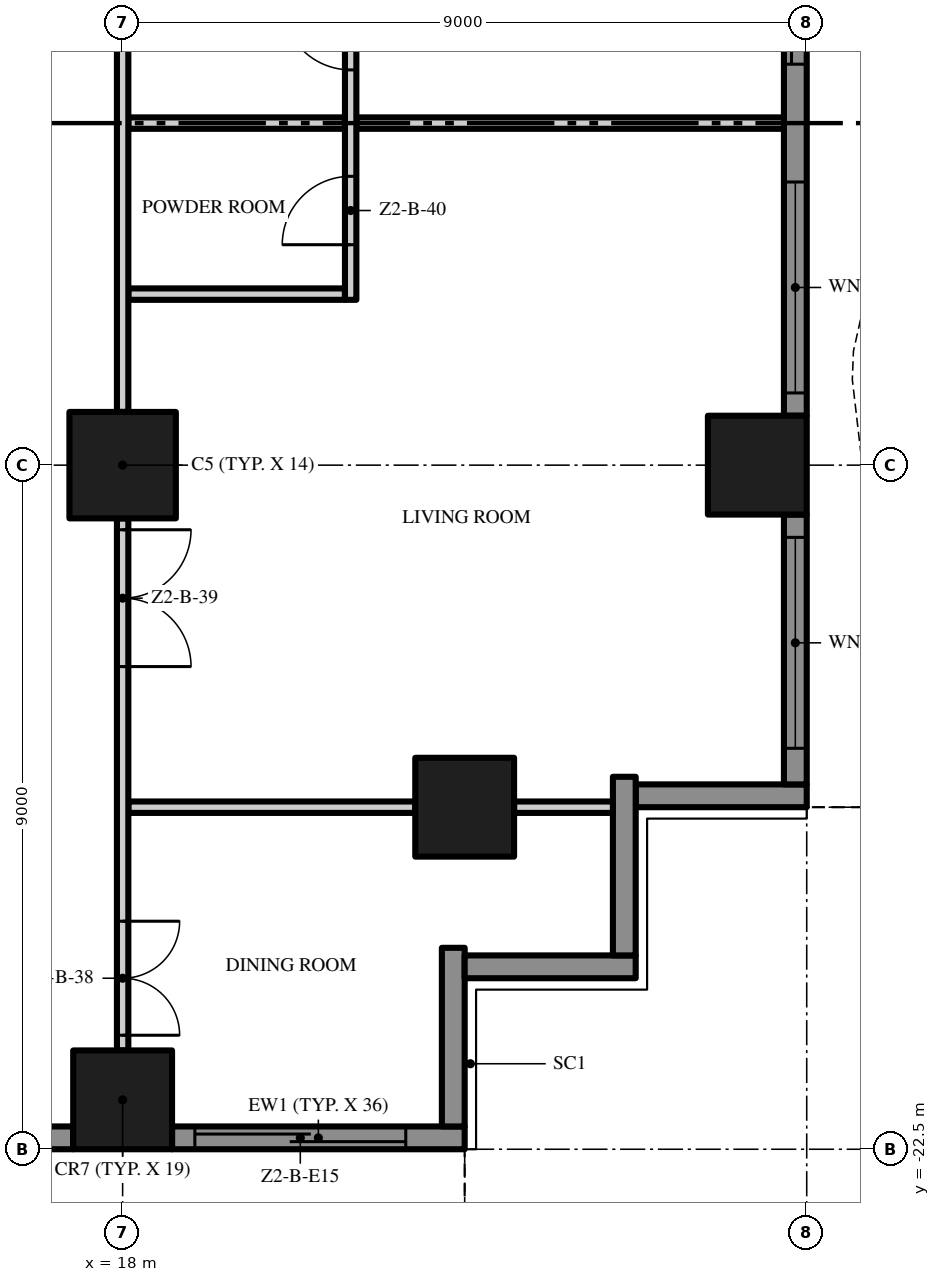
"""IFC4 building model, lengths in metres.
Left out: names, types, materials, properties, quantities, classifications, styles, units other than length and angle.
Written with IfcOpenShell. Run it as: python <this file> out.ifc"""

import sys

from ifc_helpers import new_model, si_unit, direction, frame, frame_2d, origin, origin_2d, place, context, subcontext, project, spatial, polyline, rectangle, outline, extrude, element, fill, save


model = new_model("IFC4")
c1 = context("Model", 3, precision=1e-05, world=origin(), true_north=direction((0.0, 1.0)))
c2 = subcontext(c1, "Body", "Model", "MODEL_VIEW")
j1 = project(units=[si_unit("LENGTHUNIT", "METRE"), si_unit("PLANEANGLEUNIT", "RADIAN")], contexts=[c1])
p1 = place(None, origin())
s1 = spatial("IfcSite", under=j1, at=p1, CompositionType="ELEMENT")
p2 = place(p1, origin())
s2 = spatial("IfcBuilding", under=s1, at=p2, CompositionType="ELEMENT")
p3 = place(p2, frame((0.0, 0.0, 88.4)))
s3 = spatial("IfcBuildingStorey", under=s2, at=p3, CompositionType="ELEMENT", Elevation=88.4)
p4 = place(p3, frame((18.0, -13.5, 0.0), z_axis=(0.0, 0.0, 1.0), x_axis=(1.0, 0.0, 0.0)))
e1 = element("IfcColumn", 1, at=p4, inside=s3, PredefinedType="COLUMN", context=c2, shape_type="SweptSolid", body=[
    extrude(rectangle(XDim=1.4, YDim=1.4, at=origin_2d()), origin(), (0.0, 0.0, 1.0), 3.5),
])
for number, where, z_axis, x_axis in (
    (2, (18.0, -21.85, 0.0), (0.0, 0.0, 1.0), (1.0, 0.0, 0.0)),
    (3, (26.35, -13.5, 0.0), (0.0, 0.0, 1.0), (1.0, 0.0, 0.0)),
    (4, (22.5, -18.0, 0.0), (0.0, 0.0, 1.0), (1.0, 0.0, 0.0)),
):
    element("IfcColumn", number, at=place(p3, frame(where, z_axis=z_axis, x_axis=x_axis)), inside=s3, PredefinedType="COLUMN", context=c2, shape_type="SweptSolid", body=[
        extrude(rectangle(XDim=1.3, YDim=1.3, at=origin_2d()), origin(), (0.0, 0.0, 1.0), 3.5),
    ])
p5 = place(p3, frame((17.35, -22.35, 0.0), z_axis=(0.0, 0.0, 1.0), x_axis=(-1.0, 0.0, 0.0)))
e5 = element("IfcWall", 5, at=p5, inside=s3, PredefinedType="SOLIDWALL", context=c2, shape_type="SweptSolid", body=[
    extrude(rectangle(XDim=7.7, YDim=0.3, at=frame_2d((3.85, 0.0))), origin(), (0.0, 0.0, 1.0), 3.5),
])
p6 = place(p5, frame((4.625, 0.0, 0.45)))
e6 = element("IfcOpeningElement", 6, at=p6, cuts=e5, PredefinedType="OPENING", context=c2, shape_type="SweptSolid", body=[
    extrude(rectangle(XDim=2.775, YDim=2.65, at=frame_2d((1.387, 1.325))), frame((0.0, 0.16, 0.0), z_axis=(0.0, -1.0, 0.0), x_axis=(1.0, 0.0, 0.0)), (0.0, 0.0, 1.0), 0.32),
])
p7 = place(p5, frame((0.3, 0.0, 0.45)))
e7 = element("IfcOpeningElement", 7, at=p7, cuts=e5, PredefinedType="OPENING", context=c2, shape_type="SweptSolid", body=[
    extrude(rectangle(XDim=2.775, YDim=2.65, at=frame_2d((1.387, 1.325))), frame((0.0, 0.16, 0.0), z_axis=(0.0, -1.0, 0.0), x_axis=(1.0, 0.0, 0.0)), (0.0, 0.0, 1.0), 0.32),
])
p8 = place(p3, frame((22.5, -22.35, 0.0), z_axis=(0.0, 0.0, 1.0), x_axis=(-1.0, 0.0, 0.0)))
e8 = element("IfcWall", 8, at=p8, inside=s3, PredefinedType="SOLIDWALL", context=c2, shape_type="SweptSolid", body=[
    extrude(rectangle(XDim=3.85, YDim=0.3, at=frame_2d((1.925, 0.0))), origin(), (0.0, 0.0, 1.0), 3.5),
])
p9 = place(p8, frame((0.775, 0.0, 0.0)))
e9 = element("IfcOpeningElement", 9, at=p9, cuts=e8, PredefinedType="OPENING", context=c2, shape_type="SweptSolid", body=[
    extrude(rectangle(XDim=2.775, YDim=2.4, at=frame_2d((1.387, 1.2))), frame((0.0, 0.16, 0.0), z_axis=(0.0, -1.0, 0.0), x_axis=(1.0, 0.0, 0.0)), (0.0, 0.0, 1.0), 0.32),
])
p10 = place(p3, frame((22.35, -19.85, 0.0), z_axis=(0.0, 0.0, 1.0), x_axis=(0.0, -1.0, 0.0)))
e10 = element("IfcWall", 10, at=p10, inside=s3, PredefinedType="SOLIDWALL", context=c2, shape_type="SweptSolid", body=[
    extrude(rectangle(XDim=2.35, YDim=0.3, at=frame_2d((1.175, 0.0))), origin(), (0.0, 0.0, 1.0), 3.5),
])
p11 = place(p3, frame((24.75, -20.1, 0.0), z_axis=(0.0, 0.0, 1.0), x_axis=(-1.0, 0.0, 0.0)))
e11 = element("IfcWall", 11, at=p11, inside=s3, PredefinedType="SOLIDWALL", context=c2, shape_type="SweptSolid", body=[
    extrude(rectangle(XDim=2.25, YDim=0.3, at=frame_2d((1.125, 0.0))), origin(), (0.0, 0.0, 1.0), 3.5),
])
p12 = place(p3, frame((24.6, -17.6, 0.0), z_axis=(0.0, 0.0, 1.0), x_axis=(0.0, -1.0, 0.0)))
e12 = element("IfcWall", 12, at=p12, inside=s3, PredefinedType="SOLIDWALL", context=c2, shape_type="SweptSolid", body=[
    extrude(rectangle(XDim=2.35, YDim=0.3, at=frame_2d((1.175, 0.0))), origin(), (0.0, 0.0, 1.0), 3.5),
])
p13 = place(p3, frame((27.0, -17.85, 0.0), z_axis=(0.0, 0.0, 1.0), x_axis=(-1.0, 0.0, 0.0)))
e13 = element("IfcWall", 13, at=p13, inside=s3, PredefinedType="SOLIDWALL", context=c2, shape_type="SweptSolid", body=[
    extrude(rectangle(XDim=2.25, YDim=0.3, at=frame_2d((1.125, 0.0))), origin(), (0.0, 0.0, 1.0), 3.5),
])
p14 = place(p3, frame((26.85, -14.15, 0.0), z_axis=(0.0, 0.0, 1.0), x_axis=(0.0, -1.0, 0.0)))
e14 = element("IfcWall", 14, at=p14, inside=s3, PredefinedType="SOLIDWALL", context=c2, shape_type="SweptSolid", body=[
    extrude(rectangle(XDim=3.55, YDim=0.3, at=frame_2d((1.775, 0.0))), origin(), (0.0, 0.0, 1.0), 3.5),
])
p15 = place(p14, frame((0.3, 0.0, 0.45)))
e15 = element("IfcOpeningElement", 15, at=p15, cuts=e14, PredefinedType="OPENING", context=c2, shape_type="SweptSolid", body=[
    extrude(rectangle(XDim=2.775, YDim=2.65, at=frame_2d((1.387, 1.325))), frame((0.0, 0.16, 0.0), z_axis=(0.0, -1.0, 0.0), x_axis=(1.0, 0.0, 0.0)), (0.0, 0.0, 1.0), 0.32),
])
p16 = place(p3, frame((26.85, -5.15, 0.0), z_axis=(0.0, 0.0, 1.0), x_axis=(0.0, -1.0, 0.0)))
e16 = element("IfcWall", 16, at=p16, inside=s3, PredefinedType="SOLIDWALL", context=c2, shape_type="SweptSolid", body=[
    extrude(rectangle(XDim=7.7, YDim=0.3, at=frame_2d((3.85, 0.0))), origin(), (0.0, 0.0, 1.0), 3.5),
])
p17 = place(p16, frame((4.625, 0.0, 0.45)))
e17 = element("IfcOpeningElement", 17, at=p17, cuts=e16, PredefinedType="OPENING", context=c2, shape_type="SweptSolid", body=[
    extrude(rectangle(XDim=2.775, YDim=2.65, at=frame_2d((1.387, 1.325))), frame((0.0, 0.16, 0.0), z_axis=(0.0, -1.0, 0.0), x_axis=(1.0, 0.0, 0.0)), (0.0, 0.0, 1.0), 0.32),
])
p18 = place(p16, frame((0.3, 0.0, 0.0)))
e18 = element("IfcOpeningElement", 18, at=p18, cuts=e16, PredefinedType="OPENING", context=c2, shape_type="SweptSolid", body=[
    extrude(rectangle(XDim=2.775, YDim=2.4, at=frame_2d((1.387, 1.2))), frame((0.0, 0.16, 0.0), z_axis=(0.0, -1.0, 0.0), x_axis=(1.0, 0.0, 0.0)), (0.0, 0.0, 1.0), 0.32),
])
p19 = place(p3, origin())
e19 = element("IfcWall", 19, at=p19, inside=s3, PredefinedType="USERDEFINED", context=c2, shape_type="SweptSolid", body=[
    extrude(outline(polyline([(-22.5, -25.149), (-21.0, -24.488), (-19.5, -23.755), (-18.0, -23.231), (-16.875, -23.1), (-16.5, -23.115), (-15.0, -23.451), (-13.5, -24.112), (-12.0, -24.845), (-10.5, -25.369), (-9.375, -25.5), (-9.0, -25.485), (-7.5, -25.149), (-6.0, -24.488), (-4.5, -23.755), (-3.0, -23.231), (-1.875, -23.1), (-1.5, -23.115), (0.0, -23.451), (1.5, -24.112), (3.0, -24.845), (4.5, -25.369), (5.625, -25.5), (6.0, -25.485), (7.5, -25.149), (9.0, -24.488), (10.5, -23.755), (12.0, -23.231), (13.125, -23.1), (13.5, -23.115), (15.0, -23.451), (16.5, -24.112), (18.0, -24.845), (19.5, -25.369), (20.625, -25.5), (21.0, -25.485), (22.5, -25.149), (22.445, -24.905), (20.967, -25.236), (20.635, -25.249), (19.556, -25.124), (18.096, -24.614), (16.605, -23.885), (15.079, -23.213), (13.533, -22.866), (13.115, -22.849), (11.944, -22.986), (10.404, -23.524), (8.895, -24.261), (7.421, -24.91), (5.967, -25.236), (5.635, -25.249), (4.556, -25.124), (3.096, -24.614), (1.605, -23.885), (0.079, -23.213), (-1.467, -22.866), (-1.885, -22.849), (-3.056, -22.986), (-4.596, -23.524), (-6.105, -24.261), (-7.579, -24.91), (-9.033, -25.236), (-9.365, -25.249), (-10.444, -25.124), (-11.904, -24.614), (-13.395, -23.885), (-14.921, -23.213), (-16.467, -22.866), (-16.885, -22.849), (-18.056, -22.986), (-19.596, -23.524), (-21.105, -24.261), (-22.601, -24.92), (-22.5, -25.149)])), origin(), (0.0, 0.0, 1.0), 0.9),
])
p20 = place(p3, origin())
e20 = element("IfcWall", 20, at=p20, inside=s3, PredefinedType="USERDEFINED", context=c2, shape_type="SweptSolid", body=[
    extrude(outline(polyline([(29.649, -18.0), (28.988, -16.5), (28.255, -15.0), (27.731, -13.5), (27.6, -12.375), (27.615, -12.0), (27.951, -10.5), (28.612, -9.0), (29.345, -7.5), (29.869, -6.0), (30.0, -4.875), (29.985, -4.5), (29.649, -3.0), (28.988, -1.5), (28.255, 0.0), (27.731, 1.5), (27.6, 2.625), (27.615, 3.0), (27.951, 4.5), (28.612, 6.0), (29.345, 7.5), (29.869, 9.0), (30.0, 10.125), (29.985, 10.5), (29.649, 12.0), (28.988, 13.5), (28.255, 15.0), (27.731, 16.5), (27.6, 17.625), (27.615, 18.0), (27.365, 18.01), (27.349, 17.615), (27.486, 16.444), (28.024, 14.904), (28.761, 13.395), (29.41, 11.921), (29.736, 10.467), (29.749, 10.135), (29.624, 9.056), (29.114, 7.596), (28.385, 6.105), (27.713, 4.579), (27.366, 3.033), (27.349, 2.615), (27.486, 1.444), (28.024, -0.096), (28.761, -1.605), (29.41, -3.079), (29.736, -4.533), (29.749, -4.865), (29.624, -5.944), (29.114, -7.404), (28.385, -8.895), (27.713, -10.421), (27.366, -11.967), (27.349, -12.385), (27.486, -13.556), (28.024, -15.096), (28.761, -16.605), (29.42, -18.101), (29.649, -18.0)])), origin(), (0.0, 0.0, 1.0), 0.9),
])
p21 = place(p3, frame((18.075, -18.0, 0.0), z_axis=(0.0, 0.0, 1.0), x_axis=(1.0, 0.0, 0.0)))
e21 = element("IfcWall", 21, at=p21, inside=s3, PredefinedType="PARTITIONING", context=c2, shape_type="SweptSolid", body=[
    extrude(rectangle(XDim=3.775, YDim=0.15, at=frame_2d((1.887, 0.0))), origin(), (0.0, 0.0, 1.0), 3.5),
])
p22 = place(p3, frame((23.15, -18.0, 0.0), z_axis=(0.0, 0.0, 1.0), x_axis=(1.0, 0.0, 0.0)))
e22 = element("IfcWall", 22, at=p22, inside=s3, PredefinedType="PARTITIONING", context=c2, shape_type="SweptSolid", body=[
    extrude(rectangle(XDim=1.3, YDim=0.15, at=frame_2d((0.65, 0.0))), origin(), (0.0, 0.0, 1.0), 3.5),
])
for number, where, z_axis, x_axis in (
    (23, (18.075, -11.25, 0.0), (0.0, 0.0, 1.0), (1.0, 0.0, 0.0)),
    (24, (18.075, -9.0, 0.0), (0.0, 0.0, 1.0), (1.0, 0.0, 0.0)),
):
    element("IfcWall", number, at=place(p3, frame(where, z_axis=z_axis, x_axis=x_axis)), inside=s3, PredefinedType="PARTITIONING", context=c2, shape_type="SweptSolid", body=[
        extrude(rectangle(XDim=2.85, YDim=0.15, at=frame_2d((1.425, 0.0))), origin(), (0.0, 0.0, 1.0), 3.5),
    ])
p23 = place(p3, frame((21.075, -9.0, 0.0), z_axis=(0.0, 0.0, 1.0), x_axis=(1.0, 0.0, 0.0)))
e25 = element("IfcWall", 25, at=p23, inside=s3, PredefinedType="PARTITIONING", context=c2, shape_type="SweptSolid", body=[
    extrude(rectangle(XDim=5.625, YDim=0.15, at=frame_2d((2.812, 0.0))), origin(), (0.0, 0.0, 1.0), 3.5),
])
p24 = place(p3, frame((18.0, -14.2, 0.0), z_axis=(0.0, 0.0, 1.0), x_axis=(0.0, -1.0, 0.0)))
e26 = element("IfcWall", 26, at=p24, inside=s3, PredefinedType="PARTITIONING", context=c2, shape_type="SweptSolid", body=[
    extrude(rectangle(XDim=7.0, YDim=0.15, at=frame_2d((3.5, 0.0))), origin(), (0.0, 0.0, 1.0), 3.5),
])
p25 = place(p24, frame((5.3, 0.0, 0.0)))
e27 = element("IfcOpeningElement", 27, at=p25, cuts=e26, PredefinedType="OPENING", context=c2, shape_type="SweptSolid", body=[
    extrude(rectangle(XDim=1.5, YDim=2.4, at=frame_2d((0.75, 1.2))), frame((0.0, 0.085, 0.0), z_axis=(0.0, -1.0, 0.0), x_axis=(1.0, 0.0, 0.0)), (0.0, 0.0, 1.0), 0.17),
])
p26 = place(p24, frame((0.15, 0.0, 0.0)))
e28 = element("IfcOpeningElement", 28, at=p26, cuts=e26, PredefinedType="OPENING", context=c2, shape_type="SweptSolid", body=[
    extrude(rectangle(XDim=1.8, YDim=2.4, at=frame_2d((0.9, 1.2))), frame((0.0, 0.085, 0.0), z_axis=(0.0, -1.0, 0.0), x_axis=(1.0, 0.0, 0.0)), (0.0, 0.0, 1.0), 0.17),
])
p27 = place(p3, frame((18.0, -5.2, 0.0), z_axis=(0.0, 0.0, 1.0), x_axis=(0.0, -1.0, 0.0)))
e29 = element("IfcWall", 29, at=p27, inside=s3, PredefinedType="PARTITIONING", context=c2, shape_type="SweptSolid", body=[
    extrude(rectangle(XDim=7.6, YDim=0.15, at=frame_2d((3.8, 0.0))), origin(), (0.0, 0.0, 1.0), 3.5),
])
p28 = place(p27, frame((0.15, 0.0, 0.0)))
e30 = element("IfcOpeningElement", 30, at=p28, cuts=e29, PredefinedType="OPENING", context=c2, shape_type="SweptSolid", body=[
    extrude(rectangle(XDim=1.0, YDim=2.4, at=frame_2d((0.5, 1.2))), frame((0.0, 0.085, 0.0), z_axis=(0.0, -1.0, 0.0), x_axis=(1.0, 0.0, 0.0)), (0.0, 0.0, 1.0), 0.17),
])
p29 = place(p3, frame((21.0, -11.325, 0.0), z_axis=(0.0, 0.0, 1.0), x_axis=(0.0, 1.0, 0.0)))
e31 = element("IfcWall", 31, at=p29, inside=s3, PredefinedType="PARTITIONING", context=c2, shape_type="SweptSolid", body=[
    extrude(rectangle(XDim=4.65, YDim=0.15, at=frame_2d((2.325, 0.0))), origin(), (0.0, 0.0, 1.0), 3.5),
])
p30 = place(p29, frame((0.725, 0.0, 0.0)))
e32 = element("IfcOpeningElement", 32, at=p30, cuts=e31, PredefinedType="OPENING", context=c2, shape_type="SweptSolid", body=[
    extrude(rectangle(XDim=0.9, YDim=2.1, at=frame_2d((0.45, 1.05))), frame((0.0, 0.085, 0.0), z_axis=(0.0, -1.0, 0.0), x_axis=(1.0, 0.0, 0.0)), (0.0, 0.0, 1.0), 0.17),
])
p31 = place(p29, frame((3.025, 0.0, 0.0)))
e33 = element("IfcOpeningElement", 33, at=p31, cuts=e31, PredefinedType="OPENING", context=c2, shape_type="SweptSolid", body=[
    extrude(rectangle(XDim=0.9, YDim=2.1, at=frame_2d((0.45, 1.05))), frame((0.0, 0.085, 0.0), z_axis=(0.0, -1.0, 0.0), x_axis=(1.0, 0.0, 0.0)), (0.0, 0.0, 1.0), 0.17),
])
p32 = place(p9, origin())
e34 = element("IfcDoor", 34, at=p32, inside=s3, OperationType="SINGLE_SWING_LEFT", PredefinedType="DOOR", context=c2, shape_type="SweptSolid", body=[
    extrude(rectangle(XDim=2.775, YDim=2.4, at=frame_2d((1.387, 1.2))), frame((0.0, 0.025, 0.0), z_axis=(0.0, -1.0, 0.0), x_axis=(1.0, 0.0, 0.0)), (0.0, 0.0, 1.0), 0.05),
])
fill(e9, e34)
p33 = place(p15, origin())
e35 = element("IfcWindow", 35, at=p33, inside=s3, PartitioningType="SINGLE_PANEL", PredefinedType="WINDOW", context=c2, shape_type="SweptSolid", body=[
    extrude(rectangle(XDim=2.775, YDim=2.65, at=frame_2d((1.387, 1.325))), frame((0.0, 0.03, 0.0), z_axis=(0.0, -1.0, 0.0), x_axis=(1.0, 0.0, 0.0)), (0.0, 0.0, 1.0), 0.06),
])
fill(e15, e35)
p34 = place(p17, origin())
e36 = element("IfcWindow", 36, at=p34, inside=s3, PartitioningType="SINGLE_PANEL", PredefinedType="WINDOW", context=c2, shape_type="SweptSolid", body=[
    extrude(rectangle(XDim=2.775, YDim=2.65, at=frame_2d((1.387, 1.325))), frame((0.0, 0.03, 0.0), z_axis=(0.0, -1.0, 0.0), x_axis=(1.0, 0.0, 0.0)), (0.0, 0.0, 1.0), 0.06),
])
fill(e17, e36)
p35 = place(p18, origin())
e37 = element("IfcDoor", 37, at=p35, inside=s3, OperationType="SINGLE_SWING_LEFT", PredefinedType="DOOR", context=c2, shape_type="SweptSolid", body=[
    extrude(rectangle(XDim=2.775, YDim=2.4, at=frame_2d((1.387, 1.2))), frame((0.0, 0.025, 0.0), z_axis=(0.0, -1.0, 0.0), x_axis=(1.0, 0.0, 0.0)), (0.0, 0.0, 1.0), 0.05),
])
fill(e18, e37)
p36 = place(p25, origin())
e38 = element("IfcDoor", 38, at=p36, inside=s3, OperationType="DOUBLE_DOOR_SINGLE_SWING", PredefinedType="DOOR", context=c2, shape_type="SweptSolid", body=[
    extrude(rectangle(XDim=1.5, YDim=2.4, at=frame_2d((0.75, 1.2))), frame((0.0, 0.025, 0.0), z_axis=(0.0, -1.0, 0.0), x_axis=(1.0, 0.0, 0.0)), (0.0, 0.0, 1.0), 0.05),
])
fill(e27, e38)
p37 = place(p26, origin())
e39 = element("IfcDoor", 39, at=p37, inside=s3, OperationType="DOUBLE_DOOR_SINGLE_SWING", PredefinedType="DOOR", context=c2, shape_type="SweptSolid", body=[
    extrude(rectangle(XDim=1.8, YDim=2.4, at=frame_2d((0.9, 1.2))), frame((0.0, 0.025, 0.0), z_axis=(0.0, -1.0, 0.0), x_axis=(1.0, 0.0, 0.0)), (0.0, 0.0, 1.0), 0.05),
])
fill(e28, e39)
p38 = place(p30, origin())
e40 = element("IfcDoor", 40, at=p38, inside=s3, OperationType="SINGLE_SWING_LEFT", PredefinedType="DOOR", context=c2, shape_type="SweptSolid", body=[
    extrude(rectangle(XDim=0.9, YDim=2.1, at=frame_2d((0.45, 1.05))), frame((0.0, 0.025, 0.0), z_axis=(0.0, -1.0, 0.0), x_axis=(1.0, 0.0, 0.0)), (0.0, 0.0, 1.0), 0.05),
])
fill(e32, e40)
p39 = place(p31, origin())
e41 = element("IfcDoor", 41, at=p39, inside=s3, OperationType="SINGLE_SWING_RIGHT", PredefinedType="DOOR", context=c2, shape_type="SweptSolid", body=[
    extrude(rectangle(XDim=0.9, YDim=2.1, at=frame_2d((0.45, 1.05))), frame((0.0, 0.025, 0.0), z_axis=(0.0, -1.0, 0.0), x_axis=(1.0, 0.0, 0.0)), (0.0, 0.0, 1.0), 0.05),
])
fill(e33, e41)
save(model, sys.argv[1])
